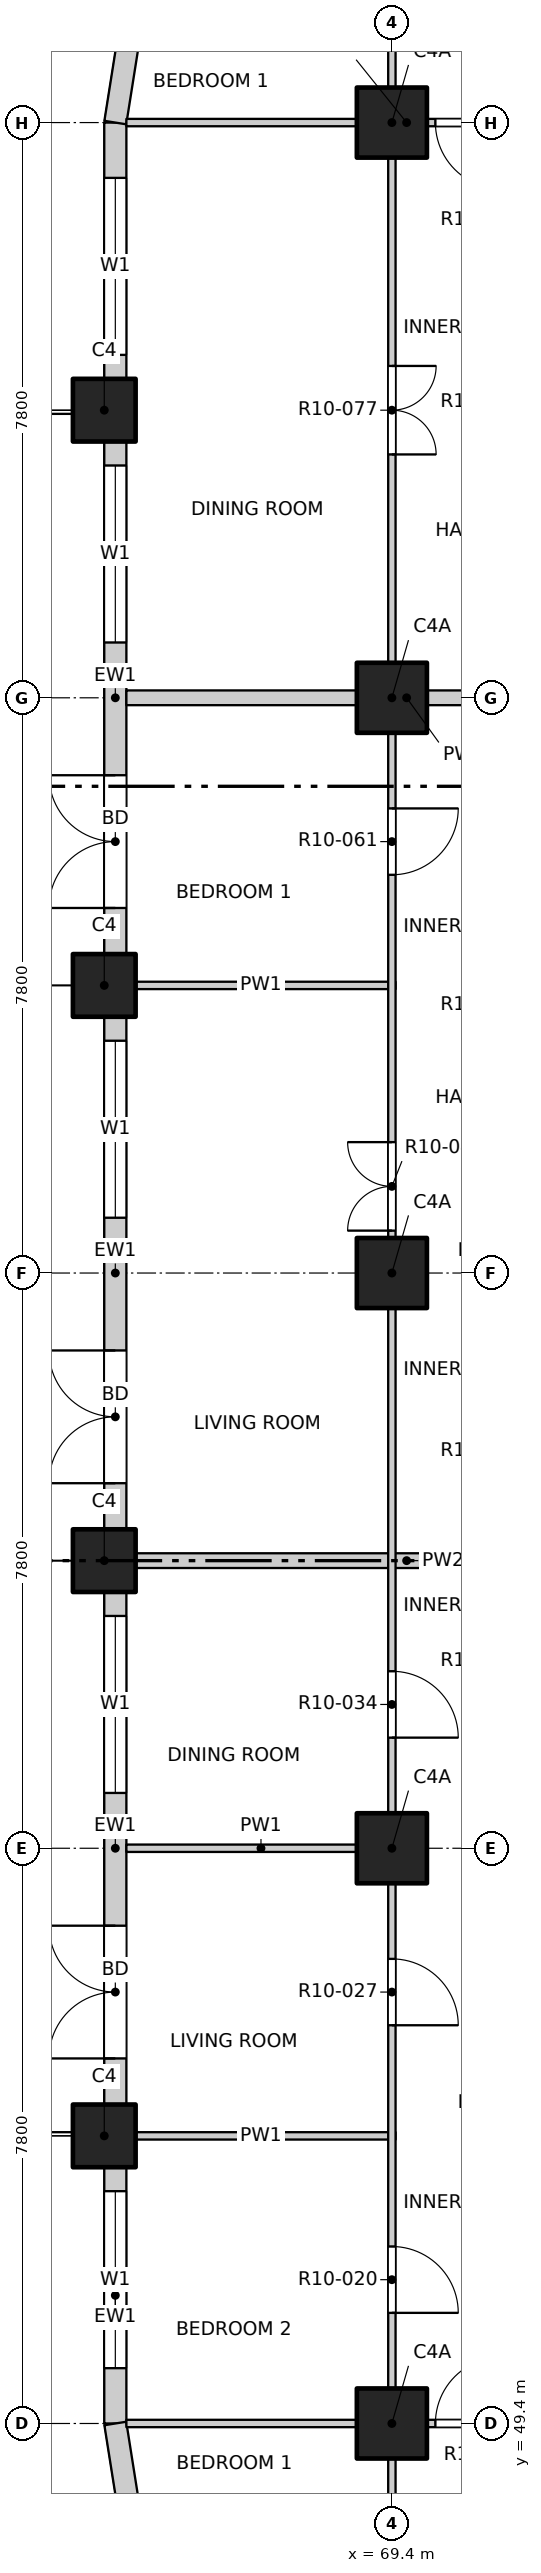
"""IFC4 building model, lengths in metres.
Left out: names, types, materials, properties, quantities, classifications, styles, units other than length and angle.
Written with IfcOpenShell. Run it as: python <this file> out.ifc"""

import sys

from ifc_helpers import new_model, si_unit, direction, frame, frame_2d, origin, origin_2d, place, context, subcontext, project, spatial, rectangle, extrude, element, fill, save


model = new_model("IFC4")
c1 = context("Model", 3, precision=1e-05, world=origin(), true_north=direction((0.0, 1.0)))
c2 = subcontext(c1, "Body", "Model", "MODEL_VIEW")
j1 = project(units=[si_unit("LENGTHUNIT", "METRE"), si_unit("PLANEANGLEUNIT", "RADIAN")], contexts=[c1])
p1 = place(None, origin())
s1 = spatial("IfcSite", under=j1, at=p1, CompositionType="ELEMENT")
p2 = place(p1, origin())
s2 = spatial("IfcBuilding", under=s1, at=p2, CompositionType="ELEMENT")
p3 = place(p2, frame((0.0, 0.0, 127.1)))
s3 = spatial("IfcBuildingStorey", under=s2, at=p3, CompositionType="ELEMENT", Elevation=127.1)
for number, where, z_axis, x_axis in (
    (1, (65.5, 53.3, -0.25), (0.0, 0.0, 1.0), (1.0, 0.0, 0.0)),
    (2, (65.5, 61.1, -0.25), (0.0, 0.0, 1.0), (1.0, 0.0, 0.0)),
    (3, (65.5, 68.9, -0.25), (0.0, 0.0, 1.0), (1.0, 0.0, 0.0)),
    (4, (65.5, 76.7, -0.25), (0.0, 0.0, 1.0), (1.0, 0.0, 0.0)),
):
    element("IfcColumn", number, at=place(p3, frame(where, z_axis=z_axis, x_axis=x_axis)), inside=s3, PredefinedType="COLUMN", context=c2, shape_type="SweptSolid", body=[
        extrude(rectangle(XDim=0.85, YDim=0.85, at=origin_2d()), origin(), (0.0, 0.0, 1.0), 3.4),
    ])
for number, where, z_axis, x_axis in (
    (5, (69.4, 49.4, -0.25), (0.0, 0.0, 1.0), (1.0, 0.0, 0.0)),
    (6, (69.4, 57.2, -0.25), (0.0, 0.0, 1.0), (1.0, 0.0, 0.0)),
    (7, (69.4, 65.0, -0.25), (0.0, 0.0, 1.0), (1.0, 0.0, 0.0)),
    (8, (69.4, 72.8, -0.25), (0.0, 0.0, 1.0), (1.0, 0.0, 0.0)),
    (9, (69.4, 80.6, -0.25), (0.0, 0.0, 1.0), (1.0, 0.0, 0.0)),
):
    element("IfcColumn", number, at=place(p3, frame(where, z_axis=z_axis, x_axis=x_axis)), inside=s3, PredefinedType="COLUMN", context=c2, shape_type="SweptSolid", body=[
        extrude(rectangle(XDim=0.95, YDim=0.95, at=origin_2d()), origin(), (0.0, 0.0, 1.0), 3.4),
    ])
p4 = place(p3, frame((65.65, 49.4, 0.0), z_axis=(0.0, 0.0, 1.0), x_axis=(0.0, 1.0, 0.0)))
e10 = element("IfcWall", 10, at=p4, inside=s3, PredefinedType="SOLIDWALL", context=c2, shape_type="SweptSolid", body=[
    extrude(rectangle(XDim=3.475, YDim=0.3, at=frame_2d((1.738, 0.0))), origin(), (0.0, 0.0, 1.0), 2.7),
])
p5 = place(p4, frame((0.75, 0.0, 0.9)))
e11 = element("IfcOpeningElement", 11, at=p5, cuts=e10, PredefinedType="OPENING", context=c2, shape_type="SweptSolid", body=[
    extrude(rectangle(XDim=2.4, YDim=1.8, at=frame_2d((1.2, 0.9))), frame((0.0, 0.16, 0.0), z_axis=(0.0, -1.0, 0.0), x_axis=(1.0, 0.0, 0.0)), (0.0, 0.0, 1.0), 0.32),
])
p6 = place(p3, frame((65.65, 53.725, 0.0), z_axis=(0.0, 0.0, 1.0), x_axis=(0.0, 1.0, 0.0)))
e12 = element("IfcWall", 12, at=p6, inside=s3, PredefinedType="SOLIDWALL", context=c2, shape_type="SweptSolid", body=[
    extrude(rectangle(XDim=6.95, YDim=0.3, at=frame_2d((3.475, 0.0))), origin(), (0.0, 0.0, 1.0), 2.7),
])
p7 = place(p6, frame((0.625, 0.0, 0.0)))
e13 = element("IfcOpeningElement", 13, at=p7, cuts=e12, PredefinedType="OPENING", context=c2, shape_type="SweptSolid", body=[
    extrude(rectangle(XDim=1.8, YDim=2.4, at=frame_2d((0.9, 1.2))), frame((0.0, 0.16, 0.0), z_axis=(0.0, -1.0, 0.0), x_axis=(1.0, 0.0, 0.0)), (0.0, 0.0, 1.0), 0.32),
])
p8 = place(p6, frame((4.225, 0.0, 0.9)))
e14 = element("IfcOpeningElement", 14, at=p8, cuts=e12, PredefinedType="OPENING", context=c2, shape_type="SweptSolid", body=[
    extrude(rectangle(XDim=2.4, YDim=1.8, at=frame_2d((1.2, 0.9))), frame((0.0, 0.16, 0.0), z_axis=(0.0, -1.0, 0.0), x_axis=(1.0, 0.0, 0.0)), (0.0, 0.0, 1.0), 0.32),
])
p9 = place(p3, frame((65.65, 61.525, 0.0), z_axis=(0.0, 0.0, 1.0), x_axis=(0.0, 1.0, 0.0)))
e15 = element("IfcWall", 15, at=p9, inside=s3, PredefinedType="SOLIDWALL", context=c2, shape_type="SweptSolid", body=[
    extrude(rectangle(XDim=6.95, YDim=0.3, at=frame_2d((3.475, 0.0))), origin(), (0.0, 0.0, 1.0), 2.7),
])
p10 = place(p9, frame((0.625, 0.0, 0.0)))
e16 = element("IfcOpeningElement", 16, at=p10, cuts=e15, PredefinedType="OPENING", context=c2, shape_type="SweptSolid", body=[
    extrude(rectangle(XDim=1.8, YDim=2.4, at=frame_2d((0.9, 1.2))), frame((0.0, 0.16, 0.0), z_axis=(0.0, -1.0, 0.0), x_axis=(1.0, 0.0, 0.0)), (0.0, 0.0, 1.0), 0.32),
])
p11 = place(p9, frame((4.225, 0.0, 0.9)))
e17 = element("IfcOpeningElement", 17, at=p11, cuts=e15, PredefinedType="OPENING", context=c2, shape_type="SweptSolid", body=[
    extrude(rectangle(XDim=2.4, YDim=1.8, at=frame_2d((1.2, 0.9))), frame((0.0, 0.16, 0.0), z_axis=(0.0, -1.0, 0.0), x_axis=(1.0, 0.0, 0.0)), (0.0, 0.0, 1.0), 0.32),
])
p12 = place(p3, frame((65.65, 69.325, 0.0), z_axis=(0.0, 0.0, 1.0), x_axis=(0.0, 1.0, 0.0)))
e18 = element("IfcWall", 18, at=p12, inside=s3, PredefinedType="SOLIDWALL", context=c2, shape_type="SweptSolid", body=[
    extrude(rectangle(XDim=6.95, YDim=0.3, at=frame_2d((3.475, 0.0))), origin(), (0.0, 0.0, 1.0), 2.7),
])
p13 = place(p12, frame((0.625, 0.0, 0.0)))
e19 = element("IfcOpeningElement", 19, at=p13, cuts=e18, PredefinedType="OPENING", context=c2, shape_type="SweptSolid", body=[
    extrude(rectangle(XDim=1.8, YDim=2.4, at=frame_2d((0.9, 1.2))), frame((0.0, 0.16, 0.0), z_axis=(0.0, -1.0, 0.0), x_axis=(1.0, 0.0, 0.0)), (0.0, 0.0, 1.0), 0.32),
])
p14 = place(p12, frame((4.225, 0.0, 0.9)))
e20 = element("IfcOpeningElement", 20, at=p14, cuts=e18, PredefinedType="OPENING", context=c2, shape_type="SweptSolid", body=[
    extrude(rectangle(XDim=2.4, YDim=1.8, at=frame_2d((1.2, 0.9))), frame((0.0, 0.16, 0.0), z_axis=(0.0, -1.0, 0.0), x_axis=(1.0, 0.0, 0.0)), (0.0, 0.0, 1.0), 0.32),
])
p15 = place(p3, frame((65.65, 77.125, 0.0), z_axis=(0.0, 0.0, 1.0), x_axis=(0.0, 1.0, 0.0)))
e21 = element("IfcWall", 21, at=p15, inside=s3, PredefinedType="SOLIDWALL", context=c2, shape_type="SweptSolid", body=[
    extrude(rectangle(XDim=3.475, YDim=0.3, at=frame_2d((1.738, 0.0))), origin(), (0.0, 0.0, 1.0), 2.7),
])
p16 = place(p15, frame((0.325, 0.0, 0.9)))
e22 = element("IfcOpeningElement", 22, at=p16, cuts=e21, PredefinedType="OPENING", context=c2, shape_type="SweptSolid", body=[
    extrude(rectangle(XDim=2.4, YDim=1.8, at=frame_2d((1.2, 0.9))), frame((0.0, 0.16, 0.0), z_axis=(0.0, -1.0, 0.0), x_axis=(1.0, 0.0, 0.0)), (0.0, 0.0, 1.0), 0.32),
])
for number, where, z_axis, x_axis in (
    (23, (65.833, 81.759, 0.0), (0.0, 0.0, 1.0), (-0.156, -0.988, 0.0)),
    (24, (65.65, 49.4, 0.0), (0.0, 0.0, 1.0), (0.156, -0.988, 0.0)),
):
    element("IfcWall", number, at=place(p3, frame(where, z_axis=z_axis, x_axis=x_axis)), inside=s3, PredefinedType="SOLIDWALL", context=c2, shape_type="SweptSolid", body=[
        extrude(rectangle(XDim=1.173, YDim=0.3, at=frame_2d((0.586, 0.0))), origin(), (0.0, 0.0, 1.0), 2.7),
    ])
p17 = place(p3, frame((65.8, 49.4, 0.0), z_axis=(0.0, 0.0, 1.0), x_axis=(1.0, 0.0, 0.0)))
e25 = element("IfcWall", 25, at=p17, inside=s3, PredefinedType="PARTITIONING", context=c2, shape_type="SweptSolid", body=[
    extrude(rectangle(XDim=38.4, YDim=0.1, at=frame_2d((19.2, 0.0))), origin(), (0.0, 0.0, 1.0), 3.15),
])
p18 = place(p17, frame((4.19, 0.0, 0.0)))
e26 = element("IfcOpeningElement", 26, at=p18, cuts=e25, PredefinedType="OPENING", context=c2, shape_type="SweptSolid", body=[
    extrude(rectangle(XDim=0.9, YDim=2.1, at=frame_2d((0.45, 1.05))), frame((0.0, 0.06, 0.0), z_axis=(0.0, -1.0, 0.0), x_axis=(1.0, 0.0, 0.0)), (0.0, 0.0, 1.0), 0.12),
])
p19 = place(p17, frame((9.0, 0.0, 0.0)))
e27 = element("IfcOpeningElement", 27, at=p19, cuts=e25, PredefinedType="OPENING", context=c2, shape_type="SweptSolid", body=[
    extrude(rectangle(XDim=0.9, YDim=2.1, at=frame_2d((0.45, 1.05))), frame((0.0, 0.06, 0.0), z_axis=(0.0, -1.0, 0.0), x_axis=(1.0, 0.0, 0.0)), (0.0, 0.0, 1.0), 0.12),
])
p20 = place(p17, frame((12.9, 0.0, 0.0)))
e28 = element("IfcOpeningElement", 28, at=p20, cuts=e25, PredefinedType="OPENING", context=c2, shape_type="SweptSolid", body=[
    extrude(rectangle(XDim=0.9, YDim=2.1, at=frame_2d((0.45, 1.05))), frame((0.0, 0.06, 0.0), z_axis=(0.0, -1.0, 0.0), x_axis=(1.0, 0.0, 0.0)), (0.0, 0.0, 1.0), 0.12),
])
p21 = place(p17, frame((16.8, 0.0, 0.0)))
e29 = element("IfcOpeningElement", 29, at=p21, cuts=e25, PredefinedType="OPENING", context=c2, shape_type="SweptSolid", body=[
    extrude(rectangle(XDim=0.9, YDim=2.1, at=frame_2d((0.45, 1.05))), frame((0.0, 0.06, 0.0), z_axis=(0.0, -1.0, 0.0), x_axis=(1.0, 0.0, 0.0)), (0.0, 0.0, 1.0), 0.12),
])
p22 = place(p17, frame((22.5, 0.0, 0.0)))
e30 = element("IfcOpeningElement", 30, at=p22, cuts=e25, PredefinedType="OPENING", context=c2, shape_type="SweptSolid", body=[
    extrude(rectangle(XDim=1.2, YDim=2.1, at=frame_2d((0.6, 1.05))), frame((0.0, 0.06, 0.0), z_axis=(0.0, -1.0, 0.0), x_axis=(1.0, 0.0, 0.0)), (0.0, 0.0, 1.0), 0.12),
])
p23 = place(p17, frame((28.5, 0.0, 0.0)))
e31 = element("IfcOpeningElement", 31, at=p23, cuts=e25, PredefinedType="OPENING", context=c2, shape_type="SweptSolid", body=[
    extrude(rectangle(XDim=0.9, YDim=2.1, at=frame_2d((0.45, 1.05))), frame((0.0, 0.06, 0.0), z_axis=(0.0, -1.0, 0.0), x_axis=(1.0, 0.0, 0.0)), (0.0, 0.0, 1.0), 0.12),
])
p24 = place(p17, frame((33.31, 0.0, 0.0)))
e32 = element("IfcOpeningElement", 32, at=p24, cuts=e25, PredefinedType="OPENING", context=c2, shape_type="SweptSolid", body=[
    extrude(rectangle(XDim=0.9, YDim=2.1, at=frame_2d((0.45, 1.05))), frame((0.0, 0.06, 0.0), z_axis=(0.0, -1.0, 0.0), x_axis=(1.0, 0.0, 0.0)), (0.0, 0.0, 1.0), 0.12),
])
for number, where, z_axis, x_axis in (
    (33, (65.8, 53.3, 0.0), (0.0, 0.0, 1.0), (1.0, 0.0, 0.0)),
    (34, (65.8, 57.2, 0.0), (0.0, 0.0, 1.0), (1.0, 0.0, 0.0)),
):
    element("IfcWall", number, at=place(p3, frame(where, z_axis=z_axis, x_axis=x_axis)), inside=s3, PredefinedType="PARTITIONING", context=c2, shape_type="SweptSolid", body=[
        extrude(rectangle(XDim=3.65, YDim=0.1, at=frame_2d((1.825, 0.0))), origin(), (0.0, 0.0, 1.0), 3.15),
    ])
p25 = place(p3, frame((65.8, 61.1, 0.0), z_axis=(0.0, 0.0, 1.0), x_axis=(1.0, 0.0, 0.0)))
e35 = element("IfcWall", 35, at=p25, inside=s3, PredefinedType="PARTITIONING", context=c2, shape_type="SweptSolid", body=[
    extrude(rectangle(XDim=7.6, YDim=0.2, at=frame_2d((3.8, 0.0))), origin(), (0.0, 0.0, 1.0), 2.55),
])
p26 = place(p3, frame((65.8, 68.9, 0.0), z_axis=(0.0, 0.0, 1.0), x_axis=(1.0, 0.0, 0.0)))
e36 = element("IfcWall", 36, at=p26, inside=s3, PredefinedType="PARTITIONING", context=c2, shape_type="SweptSolid", body=[
    extrude(rectangle(XDim=3.65, YDim=0.1, at=frame_2d((1.825, 0.0))), origin(), (0.0, 0.0, 1.0), 2.55),
])
p27 = place(p3, frame((65.8, 72.8, 0.0), z_axis=(0.0, 0.0, 1.0), x_axis=(1.0, 0.0, 0.0)))
e37 = element("IfcWall", 37, at=p27, inside=s3, PredefinedType="PARTITIONING", context=c2, shape_type="SweptSolid", body=[
    extrude(rectangle(XDim=7.6, YDim=0.2, at=frame_2d((3.8, 0.0))), origin(), (0.0, 0.0, 1.0), 3.15),
])
p28 = place(p3, frame((65.8, 80.6, 0.0), z_axis=(0.0, 0.0, 1.0), x_axis=(1.0, 0.0, 0.0)))
e38 = element("IfcWall", 38, at=p28, inside=s3, PredefinedType="PARTITIONING", context=c2, shape_type="SweptSolid", body=[
    extrude(rectangle(XDim=7.6, YDim=0.1, at=frame_2d((3.8, 0.0))), origin(), (0.0, 0.0, 1.0), 3.15),
])
p29 = place(p28, frame((4.19, 0.0, 0.0)))
e39 = element("IfcOpeningElement", 39, at=p29, cuts=e38, PredefinedType="OPENING", context=c2, shape_type="SweptSolid", body=[
    extrude(rectangle(XDim=0.9, YDim=2.1, at=frame_2d((0.45, 1.05))), frame((0.0, 0.06, 0.0), z_axis=(0.0, -1.0, 0.0), x_axis=(1.0, 0.0, 0.0)), (0.0, 0.0, 1.0), 0.12),
])
p30 = place(p3, frame((69.4, 45.8, 0.0), z_axis=(0.0, 0.0, 1.0), x_axis=(0.0, 1.0, 0.0)))
e40 = element("IfcWall", 40, at=p30, inside=s3, PredefinedType="PARTITIONING", context=c2, shape_type="SweptSolid", body=[
    extrude(rectangle(XDim=38.4, YDim=0.1, at=frame_2d((19.2, 0.0))), origin(), (0.0, 0.0, 1.0), 3.15),
])
p31 = place(p30, frame((1.05, 0.0, 0.0)))
e41 = element("IfcOpeningElement", 41, at=p31, cuts=e40, PredefinedType="OPENING", context=c2, shape_type="SweptSolid", body=[
    extrude(rectangle(XDim=1.2, YDim=2.1, at=frame_2d((0.6, 1.05))), frame((0.0, 0.06, 0.0), z_axis=(0.0, -1.0, 0.0), x_axis=(1.0, 0.0, 0.0)), (0.0, 0.0, 1.0), 0.12),
])
p32 = place(p30, frame((5.1, 0.0, 0.0)))
e42 = element("IfcOpeningElement", 42, at=p32, cuts=e40, PredefinedType="OPENING", context=c2, shape_type="SweptSolid", body=[
    extrude(rectangle(XDim=0.9, YDim=2.1, at=frame_2d((0.45, 1.05))), frame((0.0, 0.06, 0.0), z_axis=(0.0, -1.0, 0.0), x_axis=(1.0, 0.0, 0.0)), (0.0, 0.0, 1.0), 0.12),
])
p33 = place(p30, frame((9.0, 0.0, 0.0)))
e43 = element("IfcOpeningElement", 43, at=p33, cuts=e40, PredefinedType="OPENING", context=c2, shape_type="SweptSolid", body=[
    extrude(rectangle(XDim=0.9, YDim=2.1, at=frame_2d((0.45, 1.05))), frame((0.0, 0.06, 0.0), z_axis=(0.0, -1.0, 0.0), x_axis=(1.0, 0.0, 0.0)), (0.0, 0.0, 1.0), 0.12),
])
p34 = place(p30, frame((12.9, 0.0, 0.0)))
e44 = element("IfcOpeningElement", 44, at=p34, cuts=e40, PredefinedType="OPENING", context=c2, shape_type="SweptSolid", body=[
    extrude(rectangle(XDim=0.9, YDim=2.1, at=frame_2d((0.45, 1.05))), frame((0.0, 0.06, 0.0), z_axis=(0.0, -1.0, 0.0), x_axis=(1.0, 0.0, 0.0)), (0.0, 0.0, 1.0), 0.12),
])
p35 = place(p30, frame((19.775, 0.0, 0.0)))
e45 = element("IfcOpeningElement", 45, at=p35, cuts=e40, PredefinedType="OPENING", context=c2, shape_type="SweptSolid", body=[
    extrude(rectangle(XDim=1.2, YDim=2.1, at=frame_2d((0.6, 1.05))), frame((0.0, 0.06, 0.0), z_axis=(0.0, -1.0, 0.0), x_axis=(1.0, 0.0, 0.0)), (0.0, 0.0, 1.0), 0.12),
])
p36 = place(p30, frame((24.6, 0.0, 0.0)))
e46 = element("IfcOpeningElement", 46, at=p36, cuts=e40, PredefinedType="OPENING", context=c2, shape_type="SweptSolid", body=[
    extrude(rectangle(XDim=0.9, YDim=2.1, at=frame_2d((0.45, 1.05))), frame((0.0, 0.06, 0.0), z_axis=(0.0, -1.0, 0.0), x_axis=(1.0, 0.0, 0.0)), (0.0, 0.0, 1.0), 0.12),
])
p37 = place(p30, frame((30.3, 0.0, 0.0)))
e47 = element("IfcOpeningElement", 47, at=p37, cuts=e40, PredefinedType="OPENING", context=c2, shape_type="SweptSolid", body=[
    extrude(rectangle(XDim=1.2, YDim=2.1, at=frame_2d((0.6, 1.05))), frame((0.0, 0.06, 0.0), z_axis=(0.0, -1.0, 0.0), x_axis=(1.0, 0.0, 0.0)), (0.0, 0.0, 1.0), 0.12),
])
p38 = place(p30, frame((36.15, 0.0, 0.0)))
e48 = element("IfcOpeningElement", 48, at=p38, cuts=e40, PredefinedType="OPENING", context=c2, shape_type="SweptSolid", body=[
    extrude(rectangle(XDim=1.2, YDim=2.1, at=frame_2d((0.6, 1.05))), frame((0.0, 0.06, 0.0), z_axis=(0.0, -1.0, 0.0), x_axis=(1.0, 0.0, 0.0)), (0.0, 0.0, 1.0), 0.12),
])
p39 = place(p5, origin())
e49 = element("IfcWindow", 49, at=p39, inside=s3, PartitioningType="DOUBLE_PANEL_VERTICAL", PredefinedType="WINDOW", context=c2, shape_type="SweptSolid", body=[
    extrude(rectangle(XDim=2.4, YDim=1.8, at=frame_2d((1.2, 0.9))), frame((0.0, 0.03, 0.0), z_axis=(0.0, -1.0, 0.0), x_axis=(1.0, 0.0, 0.0)), (0.0, 0.0, 1.0), 0.06),
])
fill(e11, e49)
p40 = place(p7, origin())
e50 = element("IfcDoor", 50, at=p40, inside=s3, OperationType="DOUBLE_DOOR_SINGLE_SWING", PredefinedType="DOOR", context=c2, shape_type="SweptSolid", body=[
    extrude(rectangle(XDim=1.8, YDim=2.4, at=frame_2d((0.9, 1.2))), frame((0.0, 0.025, 0.0), z_axis=(0.0, -1.0, 0.0), x_axis=(1.0, 0.0, 0.0)), (0.0, 0.0, 1.0), 0.05),
])
fill(e13, e50)
p41 = place(p8, origin())
e51 = element("IfcWindow", 51, at=p41, inside=s3, PartitioningType="DOUBLE_PANEL_VERTICAL", PredefinedType="WINDOW", context=c2, shape_type="SweptSolid", body=[
    extrude(rectangle(XDim=2.4, YDim=1.8, at=frame_2d((1.2, 0.9))), frame((0.0, 0.03, 0.0), z_axis=(0.0, -1.0, 0.0), x_axis=(1.0, 0.0, 0.0)), (0.0, 0.0, 1.0), 0.06),
])
fill(e14, e51)
p42 = place(p10, origin())
e52 = element("IfcDoor", 52, at=p42, inside=s3, OperationType="DOUBLE_DOOR_SINGLE_SWING", PredefinedType="DOOR", context=c2, shape_type="SweptSolid", body=[
    extrude(rectangle(XDim=1.8, YDim=2.4, at=frame_2d((0.9, 1.2))), frame((0.0, 0.025, 0.0), z_axis=(0.0, -1.0, 0.0), x_axis=(1.0, 0.0, 0.0)), (0.0, 0.0, 1.0), 0.05),
])
fill(e16, e52)
p43 = place(p11, origin())
e53 = element("IfcWindow", 53, at=p43, inside=s3, PartitioningType="DOUBLE_PANEL_VERTICAL", PredefinedType="WINDOW", context=c2, shape_type="SweptSolid", body=[
    extrude(rectangle(XDim=2.4, YDim=1.8, at=frame_2d((1.2, 0.9))), frame((0.0, 0.03, 0.0), z_axis=(0.0, -1.0, 0.0), x_axis=(1.0, 0.0, 0.0)), (0.0, 0.0, 1.0), 0.06),
])
fill(e17, e53)
p44 = place(p13, origin())
e54 = element("IfcDoor", 54, at=p44, inside=s3, OperationType="DOUBLE_DOOR_SINGLE_SWING", PredefinedType="DOOR", context=c2, shape_type="SweptSolid", body=[
    extrude(rectangle(XDim=1.8, YDim=2.4, at=frame_2d((0.9, 1.2))), frame((0.0, 0.025, 0.0), z_axis=(0.0, -1.0, 0.0), x_axis=(1.0, 0.0, 0.0)), (0.0, 0.0, 1.0), 0.05),
])
fill(e19, e54)
p45 = place(p14, origin())
e55 = element("IfcWindow", 55, at=p45, inside=s3, PartitioningType="DOUBLE_PANEL_VERTICAL", PredefinedType="WINDOW", context=c2, shape_type="SweptSolid", body=[
    extrude(rectangle(XDim=2.4, YDim=1.8, at=frame_2d((1.2, 0.9))), frame((0.0, 0.03, 0.0), z_axis=(0.0, -1.0, 0.0), x_axis=(1.0, 0.0, 0.0)), (0.0, 0.0, 1.0), 0.06),
])
fill(e20, e55)
p46 = place(p16, origin())
e56 = element("IfcWindow", 56, at=p46, inside=s3, PartitioningType="DOUBLE_PANEL_VERTICAL", PredefinedType="WINDOW", context=c2, shape_type="SweptSolid", body=[
    extrude(rectangle(XDim=2.4, YDim=1.8, at=frame_2d((1.2, 0.9))), frame((0.0, 0.03, 0.0), z_axis=(0.0, -1.0, 0.0), x_axis=(1.0, 0.0, 0.0)), (0.0, 0.0, 1.0), 0.06),
])
fill(e22, e56)
p47 = place(p18, origin())
e57 = element("IfcDoor", 57, at=p47, inside=s3, OperationType="SINGLE_SWING_RIGHT", PredefinedType="DOOR", context=c2, shape_type="SweptSolid", body=[
    extrude(rectangle(XDim=0.9, YDim=2.1, at=frame_2d((0.45, 1.05))), frame((0.0, 0.025, 0.0), z_axis=(0.0, -1.0, 0.0), x_axis=(1.0, 0.0, 0.0)), (0.0, 0.0, 1.0), 0.05),
])
fill(e26, e57)
p48 = place(p32, origin())
e58 = element("IfcDoor", 58, at=p48, inside=s3, OperationType="SINGLE_SWING_RIGHT", PredefinedType="DOOR", context=c2, shape_type="SweptSolid", body=[
    extrude(rectangle(XDim=0.9, YDim=2.1, at=frame_2d((0.45, 1.05))), frame((0.0, 0.025, 0.0), z_axis=(0.0, -1.0, 0.0), x_axis=(1.0, 0.0, 0.0)), (0.0, 0.0, 1.0), 0.05),
])
fill(e42, e58)
p49 = place(p33, origin())
e59 = element("IfcDoor", 59, at=p49, inside=s3, OperationType="SINGLE_SWING_RIGHT", PredefinedType="DOOR", context=c2, shape_type="SweptSolid", body=[
    extrude(rectangle(XDim=0.9, YDim=2.1, at=frame_2d((0.45, 1.05))), frame((0.0, 0.025, 0.0), z_axis=(0.0, -1.0, 0.0), x_axis=(1.0, 0.0, 0.0)), (0.0, 0.0, 1.0), 0.05),
])
fill(e43, e59)
p50 = place(p34, origin())
e60 = element("IfcDoor", 60, at=p50, inside=s3, OperationType="SINGLE_SWING_RIGHT", PredefinedType="DOOR", context=c2, shape_type="SweptSolid", body=[
    extrude(rectangle(XDim=0.9, YDim=2.1, at=frame_2d((0.45, 1.05))), frame((0.0, 0.025, 0.0), z_axis=(0.0, -1.0, 0.0), x_axis=(1.0, 0.0, 0.0)), (0.0, 0.0, 1.0), 0.05),
])
fill(e44, e60)
p51 = place(p35, origin())
e61 = element("IfcDoor", 61, at=p51, inside=s3, OperationType="DOUBLE_DOOR_SINGLE_SWING", PredefinedType="DOOR", context=c2, shape_type="SweptSolid", body=[
    extrude(rectangle(XDim=1.2, YDim=2.1, at=frame_2d((0.6, 1.05))), frame((0.0, 0.025, 0.0), z_axis=(0.0, -1.0, 0.0), x_axis=(1.0, 0.0, 0.0)), (0.0, 0.0, 1.0), 0.05),
])
fill(e45, e61)
p52 = place(p36, origin())
e62 = element("IfcDoor", 62, at=p52, inside=s3, OperationType="SINGLE_SWING_LEFT", PredefinedType="DOOR", context=c2, shape_type="SweptSolid", body=[
    extrude(rectangle(XDim=0.9, YDim=2.1, at=frame_2d((0.45, 1.05))), frame((0.0, 0.025, 0.0), z_axis=(0.0, -1.0, 0.0), x_axis=(1.0, 0.0, 0.0)), (0.0, 0.0, 1.0), 0.05),
])
fill(e46, e62)
p53 = place(p37, origin())
e63 = element("IfcDoor", 63, at=p53, inside=s3, OperationType="DOUBLE_DOOR_SINGLE_SWING", PredefinedType="DOOR", context=c2, shape_type="SweptSolid", body=[
    extrude(rectangle(XDim=1.2, YDim=2.1, at=frame_2d((0.6, 1.05))), frame((0.0, 0.025, 0.0), z_axis=(0.0, -1.0, 0.0), x_axis=(1.0, 0.0, 0.0)), (0.0, 0.0, 1.0), 0.05),
])
fill(e47, e63)
p54 = place(p29, origin())
e64 = element("IfcDoor", 64, at=p54, inside=s3, OperationType="SINGLE_SWING_LEFT", PredefinedType="DOOR", context=c2, shape_type="SweptSolid", body=[
    extrude(rectangle(XDim=0.9, YDim=2.1, at=frame_2d((0.45, 1.05))), frame((0.0, 0.025, 0.0), z_axis=(0.0, -1.0, 0.0), x_axis=(1.0, 0.0, 0.0)), (0.0, 0.0, 1.0), 0.05),
])
fill(e39, e64)
save(model, sys.argv[1])
